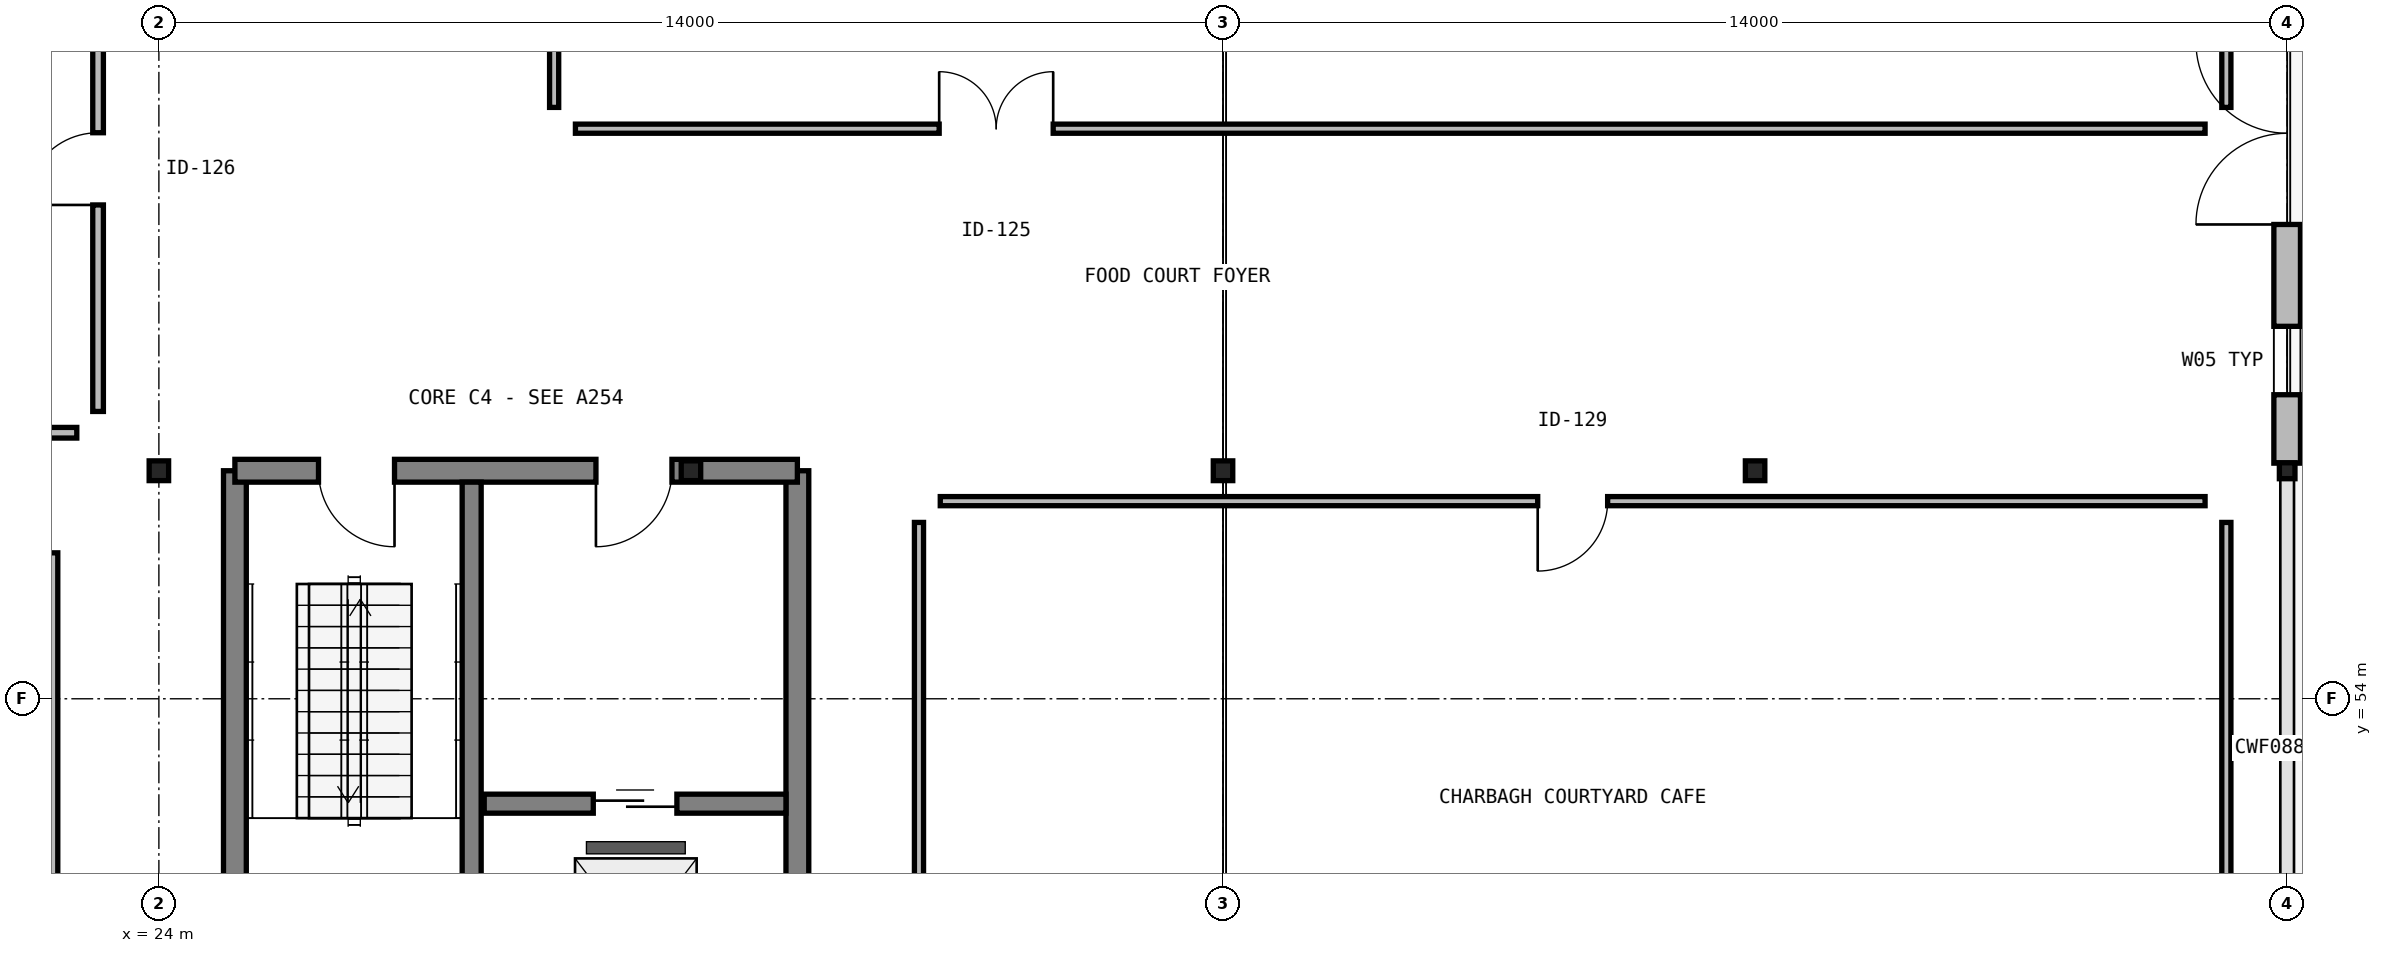
"""IFC4 building model, lengths in metres.
Left out: names, types, materials, properties, quantities, classifications, styles, units other than length and angle.
Written with IfcOpenShell. Run it as: python <this file> out.ifc"""

import sys

from ifc_helpers import new_model, si_unit, direction, frame, frame_2d, origin, origin_2d_with_axis, place, context, subcontext, project, spatial, rectangle, i_section, extrude, element, fill, save


model = new_model("IFC4")
c1 = context("Model", 3, precision=1e-05, world=origin(), true_north=direction((0.0, 1.0)))
c2 = subcontext(c1, "Body", "Model", "MODEL_VIEW")
j1 = project(units=[si_unit("LENGTHUNIT", "METRE"), si_unit("PLANEANGLEUNIT", "RADIAN")], contexts=[c1])
p1 = place(None, origin())
s1 = spatial("IfcSite", under=j1, at=p1, CompositionType="ELEMENT")
p2 = place(p1, origin())
s2 = spatial("IfcBuilding", under=s1, at=p2, CompositionType="ELEMENT")
p3 = place(p2, origin())
s3 = spatial("IfcBuildingStorey", under=s2, at=p3, CompositionType="ELEMENT", Elevation=0.0)
for number, where, z_axis, x_axis in (
    (1, (24.0, 57.0, -0.28), (0.0, 0.0, 1.0), (1.0, 0.0, 0.0)),
    (2, (31.0, 57.0, -0.28), (0.0, 0.0, 1.0), (1.0, 0.0, 0.0)),
    (3, (38.0, 57.0, -0.28), (0.0, 0.0, 1.0), (1.0, 0.0, 0.0)),
    (4, (45.0, 57.0, -0.28), (0.0, 0.0, 1.0), (1.0, 0.0, 0.0)),
):
    element("IfcColumn", number, at=place(p3, frame(where, z_axis=z_axis, x_axis=x_axis)), inside=s3, PredefinedType="COLUMN", context=c2, shape_type="SweptSolid", body=[
        extrude(i_section(OverallWidth=0.256, OverallDepth=0.26, WebThickness=0.01, FlangeThickness=0.017, FilletRadius=0.014, at=origin_2d_with_axis()), origin(), (0.0, 0.0, 1.0), 4.78),
    ])
p4 = place(p3, frame((52.0, 57.0, -0.28), z_axis=(0.0, 0.0, 1.0), x_axis=(1.0, 0.0, 0.0)))
e5 = element("IfcColumn", 5, at=p4, inside=s3, PredefinedType="COLUMN", context=c2, shape_type="SweptSolid", body=[
    extrude(i_section(OverallWidth=0.205, OverallDepth=0.21, WebThickness=0.009, FlangeThickness=0.014, FilletRadius=0.011, at=origin_2d_with_axis()), origin(), (0.0, 0.0, 1.0), 4.78),
])
p5 = place(p3, frame((52.0, 57.1, 0.0), z_axis=(0.0, 0.0, 1.0), x_axis=(0.0, 1.0, 0.0)))
e6 = element("IfcWall", 6, at=p5, inside=s3, PredefinedType="SOLIDWALL", context=c2, shape_type="SweptSolid", body=[
    extrude(rectangle(XDim=8.8, YDim=0.35, at=frame_2d((4.4, 0.0), x_axis=(1.0, 0.0))), origin(), (0.0, 0.0, 1.0), 3.88),
])
p6 = place(p5, frame((3.14, 0.0, 0.0)))
e7 = element("IfcOpeningElement", 7, at=p6, cuts=e6, PredefinedType="OPENING", context=c2, shape_type="SweptSolid", body=[
    extrude(rectangle(XDim=2.4, YDim=2.8, at=frame_2d((1.2, 1.4), x_axis=(1.0, 0.0))), frame((0.0, 0.185, 0.0), z_axis=(0.0, -1.0, 0.0), x_axis=(1.0, 0.0, 0.0)), (0.0, 0.0, 1.0), 0.37),
])
p7 = place(p5, frame((0.9, 0.0, 0.85)))
e8 = element("IfcOpeningElement", 8, at=p7, cuts=e6, PredefinedType="OPENING", context=c2, shape_type="SweptSolid", body=[
    extrude(rectangle(XDim=0.9, YDim=2.15, at=frame_2d((0.45, 1.075), x_axis=(1.0, 0.0))), frame((0.0, 0.185, 0.0), z_axis=(0.0, -1.0, 0.0), x_axis=(1.0, 0.0, 0.0)), (0.0, 0.0, 1.0), 0.37),
])
p8 = place(p5, frame((6.88, 0.0, 0.85)))
e9 = element("IfcOpeningElement", 9, at=p8, cuts=e6, PredefinedType="OPENING", context=c2, shape_type="SweptSolid", body=[
    extrude(rectangle(XDim=0.9, YDim=2.15, at=frame_2d((0.45, 1.075), x_axis=(1.0, 0.0))), frame((0.0, 0.185, 0.0), z_axis=(0.0, -1.0, 0.0), x_axis=(1.0, 0.0, 0.0)), (0.0, 0.0, 1.0), 0.37),
])
for number, where, z_axis, x_axis in (
    (10, (25.0, 57.0, 0.0), (0.0, 0.0, 1.0), (0.0, -1.0, 0.0)),
    (11, (32.4, 49.0, 0.0), (0.0, 0.0, 1.0), (0.0, 1.0, 0.0)),
):
    element("IfcWall", number, at=place(p3, frame(where, z_axis=z_axis, x_axis=x_axis)), inside=s3, PredefinedType="SHEAR", context=c2, shape_type="SweptSolid", body=[
        extrude(rectangle(XDim=8.0, YDim=0.3, at=frame_2d((4.0, 0.0), x_axis=(1.0, 0.0))), origin(), (0.0, 0.0, 1.0), 4.5),
    ])
p9 = place(p3, frame((32.4, 57.0, 0.0), z_axis=(0.0, 0.0, 1.0), x_axis=(-1.0, 0.0, 0.0)))
e12 = element("IfcWall", 12, at=p9, inside=s3, PredefinedType="SHEAR", context=c2, shape_type="SweptSolid", body=[
    extrude(rectangle(XDim=7.4, YDim=0.3, at=frame_2d((3.7, 0.0), x_axis=(1.0, 0.0))), origin(), (0.0, 0.0, 1.0), 4.5),
])
p10 = place(p9, frame((1.65, 0.0, 0.0)))
e13 = element("IfcOpeningElement", 13, at=p10, cuts=e12, PredefinedType="OPENING", context=c2, shape_type="SweptSolid", body=[
    extrude(rectangle(XDim=1.0, YDim=2.15, at=frame_2d((0.5, 1.075), x_axis=(1.0, 0.0))), frame((0.0, 0.16, 0.0), z_axis=(0.0, -1.0, 0.0), x_axis=(1.0, 0.0, 0.0)), (0.0, 0.0, 1.0), 0.32),
])
p11 = place(p9, frame((5.3, 0.0, 0.0)))
e14 = element("IfcOpeningElement", 14, at=p11, cuts=e12, PredefinedType="OPENING", context=c2, shape_type="SweptSolid", body=[
    extrude(rectangle(XDim=1.0, YDim=2.15, at=frame_2d((0.5, 1.075), x_axis=(1.0, 0.0))), frame((0.0, 0.16, 0.0), z_axis=(0.0, -1.0, 0.0), x_axis=(1.0, 0.0, 0.0)), (0.0, 0.0, 1.0), 0.32),
])
p12 = place(p3, frame((28.115, 49.15, 0.0), z_axis=(0.0, 0.0, 1.0), x_axis=(0.0, 1.0, 0.0)))
e15 = element("IfcWall", 15, at=p12, inside=s3, PredefinedType="SHEAR", context=c2, shape_type="SweptSolid", body=[
    extrude(rectangle(XDim=7.7, YDim=0.25, at=frame_2d((3.85, 0.0), x_axis=(1.0, 0.0))), origin(), (0.0, 0.0, 1.0), 4.5),
])
p13 = place(p3, frame((28.28, 52.62, 0.0), z_axis=(0.0, 0.0, 1.0), x_axis=(1.0, 0.0, 0.0)))
e16 = element("IfcWall", 16, at=p13, inside=s3, PredefinedType="SHEAR", context=c2, shape_type="SweptSolid", body=[
    extrude(rectangle(XDim=3.97, YDim=0.25, at=frame_2d((1.985, 0.0), x_axis=(1.0, 0.0))), origin(), (0.0, 0.0, 1.0), 4.24),
])
p14 = place(p13, frame((1.435, 0.0, 0.0)))
e17 = element("IfcOpeningElement", 17, at=p14, cuts=e16, PredefinedType="OPENING", context=c2, shape_type="SweptSolid", body=[
    extrude(rectangle(XDim=1.1, YDim=2.15, at=frame_2d((0.55, 1.075), x_axis=(1.0, 0.0))), frame((0.0, 0.135, 0.0), z_axis=(0.0, -1.0, 0.0), x_axis=(1.0, 0.0, 0.0)), (0.0, 0.0, 1.0), 0.27),
])
p15 = place(p3, frame((29.48, 61.5, 0.0), z_axis=(0.0, 0.0, 1.0), x_axis=(1.0, 0.0, 0.0)))
e18 = element("IfcWall", 18, at=p15, inside=s3, PredefinedType="PARTITIONING", context=c2, shape_type="SweptSolid", body=[
    extrude(rectangle(XDim=21.44, YDim=0.12, at=frame_2d((10.72, 0.0), x_axis=(1.0, 0.0))), origin(), (0.0, 0.0, 1.0), 3.62),
])
p16 = place(p15, frame((4.786, 0.0, 0.0)))
e19 = element("IfcOpeningElement", 19, at=p16, cuts=e18, PredefinedType="OPENING", context=c2, shape_type="SweptSolid", body=[
    extrude(rectangle(XDim=1.5, YDim=2.25, at=frame_2d((0.75, 1.125), x_axis=(1.0, 0.0))), frame((0.0, 0.07, 0.0), z_axis=(0.0, -1.0, 0.0), x_axis=(1.0, 0.0, 0.0)), (0.0, 0.0, 1.0), 0.14),
])
for number, where, z_axis, x_axis in (
    (20, (51.2, 61.78, 0.0), (0.0, 0.0, 1.0), (0.0, 1.0, 0.0)),
    (21, (29.2, 82.92, 0.0), (0.0, 0.0, 1.0), (0.0, -1.0, 0.0)),
):
    element("IfcWall", number, at=place(p3, frame(where, z_axis=z_axis, x_axis=x_axis)), inside=s3, PredefinedType="PARTITIONING", context=c2, shape_type="SweptSolid", body=[
        extrude(rectangle(XDim=21.14, YDim=0.12, at=frame_2d((10.57, 0.0), x_axis=(1.0, 0.0))), origin(), (0.0, 0.0, 1.0), 3.62),
    ])
p17 = place(p3, frame((11.08, 57.5, 0.0), z_axis=(0.0, 0.0, 1.0), x_axis=(1.0, 0.0, 0.0)))
e22 = element("IfcWall", 22, at=p17, inside=s3, PredefinedType="PLUMBINGWALL", context=c2, shape_type="SweptSolid", body=[
    extrude(rectangle(XDim=11.84, YDim=0.14, at=frame_2d((5.92, 0.0), x_axis=(1.0, 0.0))), origin(), (0.0, 0.0, 1.0), 3.62),
])
p18 = place(p3, frame((23.2, 57.78, 0.0), z_axis=(0.0, 0.0, 1.0), x_axis=(0.0, 1.0, 0.0)))
e23 = element("IfcWall", 23, at=p18, inside=s3, PredefinedType="PLUMBINGWALL", context=c2, shape_type="SweptSolid", body=[
    extrude(rectangle(XDim=9.44, YDim=0.14, at=frame_2d((4.72, 0.0), x_axis=(1.0, 0.0))), origin(), (0.0, 0.0, 1.0), 3.62),
])
p19 = place(p18, frame((2.717, 0.0, 0.0)))
e24 = element("IfcOpeningElement", 24, at=p19, cuts=e23, PredefinedType="OPENING", context=c2, shape_type="SweptSolid", body=[
    extrude(rectangle(XDim=0.95, YDim=2.15, at=frame_2d((0.475, 1.075), x_axis=(1.0, 0.0))), frame((0.0, 0.08, 0.0), z_axis=(0.0, -1.0, 0.0), x_axis=(1.0, 0.0, 0.0)), (0.0, 0.0, 1.0), 0.16),
])
p20 = place(p3, frame((51.2, 49.08, 0.0), z_axis=(0.0, 0.0, 1.0), x_axis=(0.0, 1.0, 0.0)))
e25 = element("IfcWall", 25, at=p20, inside=s3, PredefinedType="PARTITIONING", context=c2, shape_type="SweptSolid", body=[
    extrude(rectangle(XDim=7.24, YDim=0.12, at=frame_2d((3.62, 0.0), x_axis=(1.0, 0.0))), origin(), (0.0, 0.0, 1.0), 3.62),
])
p21 = place(p3, frame((50.92, 56.6, 0.0), z_axis=(0.0, 0.0, 1.0), x_axis=(-1.0, 0.0, 0.0)))
e26 = element("IfcWall", 26, at=p21, inside=s3, PredefinedType="PARTITIONING", context=c2, shape_type="SweptSolid", body=[
    extrude(rectangle(XDim=16.64, YDim=0.12, at=frame_2d((8.32, 0.0), x_axis=(1.0, 0.0))), origin(), (0.0, 0.0, 1.0), 3.62),
])
p22 = place(p21, frame((7.86, 0.0, 0.0)))
e27 = element("IfcOpeningElement", 27, at=p22, cuts=e26, PredefinedType="OPENING", context=c2, shape_type="SweptSolid", body=[
    extrude(rectangle(XDim=0.92, YDim=2.15, at=frame_2d((0.46, 1.075), x_axis=(1.0, 0.0))), frame((0.0, 0.07, 0.0), z_axis=(0.0, -1.0, 0.0), x_axis=(1.0, 0.0, 0.0)), (0.0, 0.0, 1.0), 0.14),
])
p23 = place(p3, frame((34.0, 56.32, 0.0), z_axis=(0.0, 0.0, 1.0), x_axis=(0.0, -1.0, 0.0)))
e28 = element("IfcWall", 28, at=p23, inside=s3, PredefinedType="PARTITIONING", context=c2, shape_type="SweptSolid", body=[
    extrude(rectangle(XDim=7.24, YDim=0.12, at=frame_2d((3.62, 0.0), x_axis=(1.0, 0.0))), origin(), (0.0, 0.0, 1.0), 3.62),
])
p24 = place(p3, frame((22.6, 49.08, 0.0), z_axis=(0.0, 0.0, 1.0), x_axis=(0.0, 1.0, 0.0)))
e29 = element("IfcWall", 29, at=p24, inside=s3, PredefinedType="PLUMBINGWALL", context=c2, shape_type="SweptSolid", body=[
    extrude(rectangle(XDim=6.84, YDim=0.14, at=frame_2d((3.42, 0.0), x_axis=(1.0, 0.0))), origin(), (0.0, 0.0, 1.0), 3.62),
])
p25 = place(p6, origin())
e30 = element("IfcDoor", 30, at=p25, inside=s3, OperationType="DOUBLE_SWING_LEFT", PredefinedType="DOOR", context=c2, shape_type="SweptSolid", body=[
    extrude(rectangle(XDim=2.4, YDim=2.8, at=frame_2d((1.2, 1.4), x_axis=(1.0, 0.0))), frame((0.0, 0.025, 0.0), z_axis=(0.0, -1.0, 0.0), x_axis=(1.0, 0.0, 0.0)), (0.0, 0.0, 1.0), 0.05),
])
fill(e7, e30)
p26 = place(p7, origin())
e31 = element("IfcWindow", 31, at=p26, inside=s3, PartitioningType="SINGLE_PANEL", PredefinedType="WINDOW", context=c2, shape_type="SweptSolid", body=[
    extrude(rectangle(XDim=0.9, YDim=2.15, at=frame_2d((0.45, 1.075), x_axis=(1.0, 0.0))), frame((0.0, 0.03, 0.0), z_axis=(0.0, -1.0, 0.0), x_axis=(1.0, 0.0, 0.0)), (0.0, 0.0, 1.0), 0.06),
])
fill(e8, e31)
p27 = place(p10, origin())
e32 = element("IfcDoor", 32, at=p27, inside=s3, OperationType="SINGLE_SWING_RIGHT", PredefinedType="DOOR", context=c2, shape_type="SweptSolid", body=[
    extrude(rectangle(XDim=1.0, YDim=2.15, at=frame_2d((0.5, 1.075), x_axis=(1.0, 0.0))), frame((0.0, 0.025, 0.0), z_axis=(0.0, -1.0, 0.0), x_axis=(1.0, 0.0, 0.0)), (0.0, 0.0, 1.0), 0.05),
])
fill(e13, e32)
p28 = place(p11, origin())
e33 = element("IfcDoor", 33, at=p28, inside=s3, OperationType="SINGLE_SWING_LEFT", PredefinedType="DOOR", context=c2, shape_type="SweptSolid", body=[
    extrude(rectangle(XDim=1.0, YDim=2.15, at=frame_2d((0.5, 1.075), x_axis=(1.0, 0.0))), frame((0.0, 0.025, 0.0), z_axis=(0.0, -1.0, 0.0), x_axis=(1.0, 0.0, 0.0)), (0.0, 0.0, 1.0), 0.05),
])
fill(e14, e33)
p29 = place(p14, origin())
e34 = element("IfcDoor", 34, at=p29, inside=s3, OperationType="SLIDING_TO_LEFT", PredefinedType="DOOR", context=c2, shape_type="SweptSolid", body=[
    extrude(rectangle(XDim=1.1, YDim=2.15, at=frame_2d((0.55, 1.075), x_axis=(1.0, 0.0))), frame((0.0, 0.025, 0.0), z_axis=(0.0, -1.0, 0.0), x_axis=(1.0, 0.0, 0.0)), (0.0, 0.0, 1.0), 0.05),
])
fill(e17, e34)
p30 = place(p16, origin())
e35 = element("IfcDoor", 35, at=p30, inside=s3, OperationType="DOUBLE_SWING_RIGHT", PredefinedType="DOOR", context=c2, shape_type="SweptSolid", body=[
    extrude(rectangle(XDim=1.5, YDim=2.25, at=frame_2d((0.75, 1.125), x_axis=(1.0, 0.0))), frame((0.0, 0.025, 0.0), z_axis=(0.0, -1.0, 0.0), x_axis=(1.0, 0.0, 0.0)), (0.0, 0.0, 1.0), 0.05),
])
fill(e19, e35)
p31 = place(p19, origin())
e36 = element("IfcDoor", 36, at=p31, inside=s3, OperationType="SINGLE_SWING_LEFT", PredefinedType="DOOR", context=c2, shape_type="SweptSolid", body=[
    extrude(rectangle(XDim=0.95, YDim=2.15, at=frame_2d((0.475, 1.075), x_axis=(1.0, 0.0))), frame((0.0, 0.025, 0.0), z_axis=(0.0, -1.0, 0.0), x_axis=(1.0, 0.0, 0.0)), (0.0, 0.0, 1.0), 0.05),
])
fill(e24, e36)
p32 = place(p22, origin())
e37 = element("IfcDoor", 37, at=p32, inside=s3, OperationType="SINGLE_SWING_RIGHT", PredefinedType="DOOR", context=c2, shape_type="SweptSolid", body=[
    extrude(rectangle(XDim=0.92, YDim=2.15, at=frame_2d((0.46, 1.075), x_axis=(1.0, 0.0))), frame((0.0, 0.025, 0.0), z_axis=(0.0, -1.0, 0.0), x_axis=(1.0, 0.0, 0.0)), (0.0, 0.0, 1.0), 0.05),
])
fill(e27, e37)
save(model, sys.argv[1])
